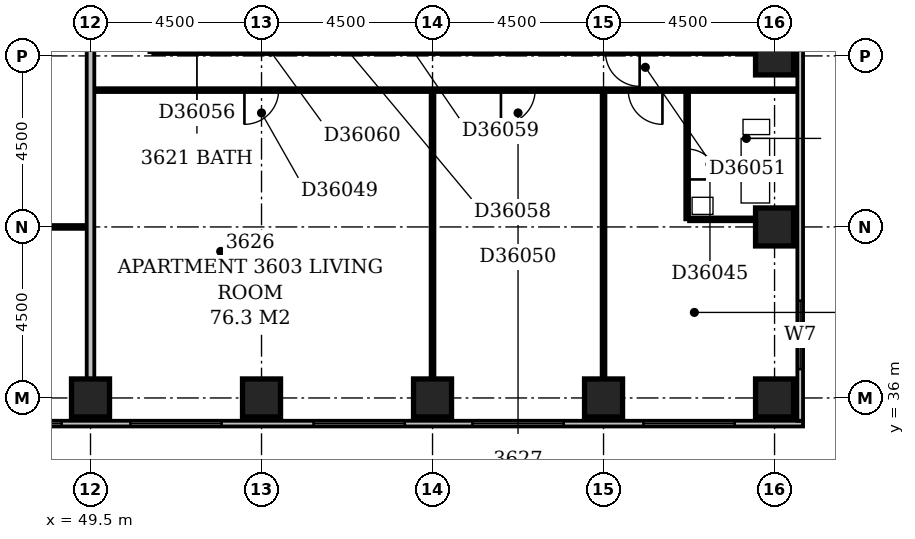
"""IFC4 building model, lengths in metres.
Left out: names, types, materials, properties, quantities, classifications, styles, units other than length and angle.
Written with IfcOpenShell. Run it as: python <this file> out.ifc"""

import sys

from ifc_helpers import new_model, si_unit, direction, frame, frame_2d, origin, origin_2d, place, context, subcontext, project, spatial, rectangle, extrude, element, fill, save


model = new_model("IFC4")
c1 = context("Model", 3, precision=1e-05, world=origin(), true_north=direction((0.0, 1.0)))
c2 = subcontext(c1, "Body", "Model", "MODEL_VIEW")
j1 = project(units=[si_unit("LENGTHUNIT", "METRE"), si_unit("PLANEANGLEUNIT", "RADIAN")], contexts=[c1])
p1 = place(None, origin())
s1 = spatial("IfcSite", under=j1, at=p1, CompositionType="ELEMENT")
p2 = place(p1, origin())
s2 = spatial("IfcBuilding", under=s1, at=p2, CompositionType="ELEMENT")
p3 = place(p2, frame((0.0, 0.0, 144.8)))
s3 = spatial("IfcBuildingStorey", under=s2, at=p3, CompositionType="ELEMENT", Elevation=144.8)
for number, where, z_axis, x_axis in (
    (1, (49.5, 36.0, -0.3), (0.0, 0.0, 1.0), (1.0, 0.0, 0.0)),
    (2, (54.0, 36.0, -0.3), (0.0, 0.0, 1.0), (1.0, 0.0, 0.0)),
    (3, (58.5, 36.0, -0.3), (0.0, 0.0, 1.0), (1.0, 0.0, 0.0)),
    (4, (63.0, 36.0, -0.3), (0.0, 0.0, 1.0), (1.0, 0.0, 0.0)),
    (5, (67.5, 36.0, -0.3), (0.0, 0.0, 1.0), (1.0, 0.0, 0.0)),
    (6, (67.5, 40.5, -0.3), (0.0, 0.0, 1.0), (1.0, 0.0, 0.0)),
    (7, (67.5, 45.0, -0.3), (0.0, 0.0, 1.0), (1.0, 0.0, 0.0)),
):
    element("IfcColumn", number, at=place(p3, frame(where, z_axis=z_axis, x_axis=x_axis)), inside=s3, PredefinedType="COLUMN", context=c2, shape_type="SweptSolid", body=[
        extrude(rectangle(XDim=1.0, YDim=1.0, at=origin_2d()), origin(), (0.0, 0.0, 1.0), 3.6),
    ])
p4 = place(p3, frame((23.1, 35.325, 0.0), z_axis=(0.0, 0.0, 1.0), x_axis=(1.0, 0.0, 0.0)))
e8 = element("IfcWall", 8, at=p4, inside=s3, PredefinedType="STANDARD", context=c2, shape_type="SweptSolid", body=[
    extrude(rectangle(XDim=45.15, YDim=0.15, at=frame_2d((22.575, 0.0))), origin(), (0.0, 0.0, 1.0), 2.7),
])
p5 = place(p4, frame((0.306, 0.0, 0.6)))
e9 = element("IfcOpeningElement", 9, at=p5, cuts=e8, PredefinedType="OPENING", context=c2, shape_type="SweptSolid", body=[
    extrude(rectangle(XDim=2.4, YDim=1.8, at=frame_2d((1.2, 0.9))), frame((0.0, 0.087, 0.0), z_axis=(0.0, -1.0, 0.0), x_axis=(1.0, 0.0, 0.0)), (0.0, 0.0, 1.0), 0.174),
])
p6 = place(p4, frame((4.95, 0.0, 0.6)))
e10 = element("IfcOpeningElement", 10, at=p6, cuts=e8, PredefinedType="OPENING", context=c2, shape_type="SweptSolid", body=[
    extrude(rectangle(XDim=2.4, YDim=1.8, at=frame_2d((1.2, 0.9))), frame((0.0, 0.087, 0.0), z_axis=(0.0, -1.0, 0.0), x_axis=(1.0, 0.0, 0.0)), (0.0, 0.0, 1.0), 0.174),
])
p7 = place(p4, frame((9.45, 0.0, 0.6)))
e11 = element("IfcOpeningElement", 11, at=p7, cuts=e8, PredefinedType="OPENING", context=c2, shape_type="SweptSolid", body=[
    extrude(rectangle(XDim=2.4, YDim=1.8, at=frame_2d((1.2, 0.9))), frame((0.0, 0.087, 0.0), z_axis=(0.0, -1.0, 0.0), x_axis=(1.0, 0.0, 0.0)), (0.0, 0.0, 1.0), 0.174),
])
p8 = place(p4, frame((13.95, 0.0, 0.6)))
e12 = element("IfcOpeningElement", 12, at=p8, cuts=e8, PredefinedType="OPENING", context=c2, shape_type="SweptSolid", body=[
    extrude(rectangle(XDim=2.4, YDim=1.8, at=frame_2d((1.2, 0.9))), frame((0.0, 0.087, 0.0), z_axis=(0.0, -1.0, 0.0), x_axis=(1.0, 0.0, 0.0)), (0.0, 0.0, 1.0), 0.174),
])
p9 = place(p4, frame((18.45, 0.0, 0.6)))
e13 = element("IfcOpeningElement", 13, at=p9, cuts=e8, PredefinedType="OPENING", context=c2, shape_type="SweptSolid", body=[
    extrude(rectangle(XDim=2.4, YDim=1.8, at=frame_2d((1.2, 0.9))), frame((0.0, 0.087, 0.0), z_axis=(0.0, -1.0, 0.0), x_axis=(1.0, 0.0, 0.0)), (0.0, 0.0, 1.0), 0.174),
])
p10 = place(p4, frame((23.84, 0.0, 0.6)))
e14 = element("IfcOpeningElement", 14, at=p10, cuts=e8, PredefinedType="OPENING", context=c2, shape_type="SweptSolid", body=[
    extrude(rectangle(XDim=1.8, YDim=1.8, at=frame_2d((0.9, 0.9))), frame((0.0, 0.087, 0.0), z_axis=(0.0, -1.0, 0.0), x_axis=(1.0, 0.0, 0.0)), (0.0, 0.0, 1.0), 0.174),
])
p11 = place(p4, frame((27.45, 0.0, 0.6)))
e15 = element("IfcOpeningElement", 15, at=p11, cuts=e8, PredefinedType="OPENING", context=c2, shape_type="SweptSolid", body=[
    extrude(rectangle(XDim=2.4, YDim=1.8, at=frame_2d((1.2, 0.9))), frame((0.0, 0.087, 0.0), z_axis=(0.0, -1.0, 0.0), x_axis=(1.0, 0.0, 0.0)), (0.0, 0.0, 1.0), 0.174),
])
p12 = place(p4, frame((32.27, 0.0, 0.6)))
e16 = element("IfcOpeningElement", 16, at=p12, cuts=e8, PredefinedType="OPENING", context=c2, shape_type="SweptSolid", body=[
    extrude(rectangle(XDim=2.4, YDim=1.8, at=frame_2d((1.2, 0.9))), frame((0.0, 0.087, 0.0), z_axis=(0.0, -1.0, 0.0), x_axis=(1.0, 0.0, 0.0)), (0.0, 0.0, 1.0), 0.174),
])
p13 = place(p4, frame((36.45, 0.0, 0.6)))
e17 = element("IfcOpeningElement", 17, at=p13, cuts=e8, PredefinedType="OPENING", context=c2, shape_type="SweptSolid", body=[
    extrude(rectangle(XDim=2.4, YDim=1.8, at=frame_2d((1.2, 0.9))), frame((0.0, 0.087, 0.0), z_axis=(0.0, -1.0, 0.0), x_axis=(1.0, 0.0, 0.0)), (0.0, 0.0, 1.0), 0.174),
])
p14 = place(p4, frame((40.95, 0.0, 0.6)))
e18 = element("IfcOpeningElement", 18, at=p14, cuts=e8, PredefinedType="OPENING", context=c2, shape_type="SweptSolid", body=[
    extrude(rectangle(XDim=2.4, YDim=1.8, at=frame_2d((1.2, 0.9))), frame((0.0, 0.087, 0.0), z_axis=(0.0, -1.0, 0.0), x_axis=(1.0, 0.0, 0.0)), (0.0, 0.0, 1.0), 0.174),
])
p15 = place(p3, frame((68.175, 35.4, 0.0), z_axis=(0.0, 0.0, 1.0), x_axis=(0.0, 1.0, 0.0)))
e19 = element("IfcWall", 19, at=p15, inside=s3, PredefinedType="STANDARD", context=c2, shape_type="SweptSolid", body=[
    extrude(rectangle(XDim=23.85, YDim=0.15, at=frame_2d((11.925, 0.0))), origin(), (0.0, 0.0, 1.0), 2.7),
])
p16 = place(p15, frame((1.36, 0.0, 0.6)))
e20 = element("IfcOpeningElement", 20, at=p16, cuts=e19, PredefinedType="OPENING", context=c2, shape_type="SweptSolid", body=[
    extrude(rectangle(XDim=1.8, YDim=1.8, at=frame_2d((0.9, 0.9))), frame((0.0, 0.087, 0.0), z_axis=(0.0, -1.0, 0.0), x_axis=(1.0, 0.0, 0.0)), (0.0, 0.0, 1.0), 0.174),
])
p17 = place(p15, frame((10.65, 0.0, 0.6)))
e21 = element("IfcOpeningElement", 21, at=p17, cuts=e19, PredefinedType="OPENING", context=c2, shape_type="SweptSolid", body=[
    extrude(rectangle(XDim=2.4, YDim=1.8, at=frame_2d((1.2, 0.9))), frame((0.0, 0.087, 0.0), z_axis=(0.0, -1.0, 0.0), x_axis=(1.0, 0.0, 0.0)), (0.0, 0.0, 1.0), 0.174),
])
p18 = place(p3, frame((49.5, 36.5, 0.0), z_axis=(0.0, 0.0, 1.0), x_axis=(0.0, 1.0, 0.0)))
e22 = element("IfcWall", 22, at=p18, inside=s3, PredefinedType="PARTITIONING", context=c2, shape_type="SweptSolid", body=[
    extrude(rectangle(XDim=12.9, YDim=0.2, at=frame_2d((6.45, 0.0))), origin(), (0.0, 0.0, 1.0), 3.3),
])
p19 = place(p3, frame((58.5, 36.5, 0.0), z_axis=(0.0, 0.0, 1.0), x_axis=(0.0, 1.0, 0.0)))
e23 = element("IfcWall", 23, at=p19, inside=s3, PredefinedType="PARTITIONING", context=c2, shape_type="SweptSolid", body=[
    extrude(rectangle(XDim=7.55, YDim=0.1, at=frame_2d((3.775, 0.0))), origin(), (0.0, 0.0, 1.0), 3.3),
])
p20 = place(p3, frame((63.0, 36.5, 0.0), z_axis=(0.0, 0.0, 1.0), x_axis=(0.0, 1.0, 0.0)))
e24 = element("IfcWall", 24, at=p20, inside=s3, PredefinedType="PARTITIONING", context=c2, shape_type="SweptSolid", body=[
    extrude(rectangle(XDim=7.55, YDim=0.1, at=frame_2d((3.775, 0.0))), origin(), (0.0, 0.0, 1.0), 2.4),
])
p21 = place(p3, frame((45.1, 40.5, 0.0), z_axis=(0.0, 0.0, 1.0), x_axis=(1.0, 0.0, 0.0)))
e25 = element("IfcWall", 25, at=p21, inside=s3, PredefinedType="PARTITIONING", context=c2, shape_type="SweptSolid", body=[
    extrude(rectangle(XDim=4.3, YDim=0.1, at=frame_2d((2.15, 0.0))), origin(), (0.0, 0.0, 1.0), 3.3),
])
p22 = place(p21, frame((1.7, 0.0, 0.0)))
e26 = element("IfcOpeningElement", 26, at=p22, cuts=e25, PredefinedType="OPENING", context=c2, shape_type="SweptSolid", body=[
    extrude(rectangle(XDim=0.9, YDim=2.1, at=frame_2d((0.45, 1.05))), frame((0.0, 0.062, 0.0), z_axis=(0.0, -1.0, 0.0), x_axis=(1.0, 0.0, 0.0)), (0.0, 0.0, 1.0), 0.124),
])
p23 = place(p3, frame((65.2, 40.7, 0.0), z_axis=(0.0, 0.0, 1.0), x_axis=(0.0, 1.0, 0.0)))
e27 = element("IfcWall", 27, at=p23, inside=s3, PredefinedType="PLUMBINGWALL", context=c2, shape_type="SweptSolid", body=[
    extrude(rectangle(XDim=3.35, YDim=0.1, at=frame_2d((1.675, 0.0))), origin(), (0.0, 0.0, 1.0), 3.3),
])
p24 = place(p23, frame((1.05, 0.0, 0.0)))
e28 = element("IfcOpeningElement", 28, at=p24, cuts=e27, PredefinedType="OPENING", context=c2, shape_type="SweptSolid", body=[
    extrude(rectangle(XDim=0.8, YDim=2.1, at=frame_2d((0.4, 1.05))), frame((0.0, 0.062, 0.0), z_axis=(0.0, -1.0, 0.0), x_axis=(1.0, 0.0, 0.0)), (0.0, 0.0, 1.0), 0.124),
])
p25 = place(p3, frame((65.25, 40.7, 0.0), z_axis=(0.0, 0.0, 1.0), x_axis=(1.0, 0.0, 0.0)))
e29 = element("IfcWall", 29, at=p25, inside=s3, PredefinedType="PLUMBINGWALL", context=c2, shape_type="SweptSolid", body=[
    extrude(rectangle(XDim=1.75, YDim=0.1, at=frame_2d((0.875, 0.0))), origin(), (0.0, 0.0, 1.0), 3.3),
])
p26 = place(p3, frame((49.6, 44.1, 0.0), z_axis=(0.0, 0.0, 1.0), x_axis=(1.0, 0.0, 0.0)))
e30 = element("IfcWall", 30, at=p26, inside=s3, PredefinedType="PARTITIONING", context=c2, shape_type="SweptSolid", body=[
    extrude(rectangle(XDim=18.5, YDim=0.1, at=frame_2d((9.25, 0.0))), origin(), (0.0, 0.0, 1.0), 3.3),
])
p27 = place(p26, frame((3.95, 0.0, 0.0)))
e31 = element("IfcOpeningElement", 31, at=p27, cuts=e30, PredefinedType="OPENING", context=c2, shape_type="SweptSolid", body=[
    extrude(rectangle(XDim=0.9, YDim=2.1, at=frame_2d((0.45, 1.05))), frame((0.0, 0.062, 0.0), z_axis=(0.0, -1.0, 0.0), x_axis=(1.0, 0.0, 0.0)), (0.0, 0.0, 1.0), 0.124),
])
p28 = place(p26, frame((10.7, 0.0, 0.0)))
e32 = element("IfcOpeningElement", 32, at=p28, cuts=e30, PredefinedType="OPENING", context=c2, shape_type="SweptSolid", body=[
    extrude(rectangle(XDim=0.9, YDim=2.1, at=frame_2d((0.45, 1.05))), frame((0.0, 0.062, 0.0), z_axis=(0.0, -1.0, 0.0), x_axis=(1.0, 0.0, 0.0)), (0.0, 0.0, 1.0), 0.124),
])
p29 = place(p26, frame((14.05, 0.0, 0.0)))
e33 = element("IfcOpeningElement", 33, at=p29, cuts=e30, PredefinedType="OPENING", context=c2, shape_type="SweptSolid", body=[
    extrude(rectangle(XDim=0.9, YDim=2.1, at=frame_2d((0.45, 1.05))), frame((0.0, 0.062, 0.0), z_axis=(0.0, -1.0, 0.0), x_axis=(1.0, 0.0, 0.0)), (0.0, 0.0, 1.0), 0.124),
])
p30 = place(p3, frame((51.15, 45.1, 0.0), z_axis=(0.0, 0.0, 1.0), x_axis=(1.0, 0.0, 0.0)))
e34 = element("IfcWall", 34, at=p30, inside=s3, PredefinedType="PARTITIONING", context=c2, shape_type="SweptSolid", body=[
    extrude(rectangle(XDim=15.85, YDim=0.1, at=frame_2d((7.925, 0.0))), origin(), (0.0, 0.0, 1.0), 3.3),
])
p31 = place(p30, frame((0.75, 0.0, 0.0)))
e35 = element("IfcOpeningElement", 35, at=p31, cuts=e34, PredefinedType="OPENING", context=c2, shape_type="SweptSolid", body=[
    extrude(rectangle(XDim=0.8, YDim=2.1, at=frame_2d((0.4, 1.05))), frame((0.0, 0.062, 0.0), z_axis=(0.0, -1.0, 0.0), x_axis=(1.0, 0.0, 0.0)), (0.0, 0.0, 1.0), 0.124),
])
p32 = place(p30, frame((11.9, 0.0, 0.0)))
e36 = element("IfcOpeningElement", 36, at=p32, cuts=e34, PredefinedType="OPENING", context=c2, shape_type="SweptSolid", body=[
    extrude(rectangle(XDim=0.9, YDim=2.1, at=frame_2d((0.45, 1.05))), frame((0.0, 0.062, 0.0), z_axis=(0.0, -1.0, 0.0), x_axis=(1.0, 0.0, 0.0)), (0.0, 0.0, 1.0), 0.124),
])
p33 = place(p30, frame((4.25, 0.0, 0.0)))
e37 = element("IfcOpeningElement", 37, at=p33, cuts=e34, PredefinedType="OPENING", context=c2, shape_type="SweptSolid", body=[
    extrude(rectangle(XDim=0.8, YDim=2.1, at=frame_2d((0.4, 1.05))), frame((0.0, 0.062, 0.0), z_axis=(0.0, -1.0, 0.0), x_axis=(1.0, 0.0, 0.0)), (0.0, 0.0, 1.0), 0.124),
])
p34 = place(p30, frame((6.05, 0.0, 0.0)))
e38 = element("IfcOpeningElement", 38, at=p34, cuts=e34, PredefinedType="OPENING", context=c2, shape_type="SweptSolid", body=[
    extrude(rectangle(XDim=0.8, YDim=2.1, at=frame_2d((0.4, 1.05))), frame((0.0, 0.062, 0.0), z_axis=(0.0, -1.0, 0.0), x_axis=(1.0, 0.0, 0.0)), (0.0, 0.0, 1.0), 0.124),
])
p35 = place(p30, frame((2.7, 0.0, 0.0)))
e39 = element("IfcOpeningElement", 39, at=p35, cuts=e34, PredefinedType="OPENING", context=c2, shape_type="SweptSolid", body=[
    extrude(rectangle(XDim=0.8, YDim=2.1, at=frame_2d((0.4, 1.05))), frame((0.0, 0.062, 0.0), z_axis=(0.0, -1.0, 0.0), x_axis=(1.0, 0.0, 0.0)), (0.0, 0.0, 1.0), 0.124),
])
p36 = place(p10, origin())
e40 = element("IfcWindow", 40, at=p36, inside=s3, PartitioningType="SINGLE_PANEL", PredefinedType="WINDOW", context=c2, shape_type="SweptSolid", body=[
    extrude(rectangle(XDim=1.8, YDim=1.8, at=frame_2d((0.9, 0.9))), frame((0.0, 0.03, 0.0), z_axis=(0.0, -1.0, 0.0), x_axis=(1.0, 0.0, 0.0)), (0.0, 0.0, 1.0), 0.06),
])
fill(e14, e40)
p37 = place(p11, origin())
e41 = element("IfcWindow", 41, at=p37, inside=s3, PartitioningType="SINGLE_PANEL", PredefinedType="WINDOW", context=c2, shape_type="SweptSolid", body=[
    extrude(rectangle(XDim=2.4, YDim=1.8, at=frame_2d((1.2, 0.9))), frame((0.0, 0.03, 0.0), z_axis=(0.0, -1.0, 0.0), x_axis=(1.0, 0.0, 0.0)), (0.0, 0.0, 1.0), 0.06),
])
fill(e15, e41)
p38 = place(p12, origin())
e42 = element("IfcWindow", 42, at=p38, inside=s3, PartitioningType="SINGLE_PANEL", PredefinedType="WINDOW", context=c2, shape_type="SweptSolid", body=[
    extrude(rectangle(XDim=2.4, YDim=1.8, at=frame_2d((1.2, 0.9))), frame((0.0, 0.03, 0.0), z_axis=(0.0, -1.0, 0.0), x_axis=(1.0, 0.0, 0.0)), (0.0, 0.0, 1.0), 0.06),
])
fill(e16, e42)
p39 = place(p13, origin())
e43 = element("IfcWindow", 43, at=p39, inside=s3, PartitioningType="SINGLE_PANEL", PredefinedType="WINDOW", context=c2, shape_type="SweptSolid", body=[
    extrude(rectangle(XDim=2.4, YDim=1.8, at=frame_2d((1.2, 0.9))), frame((0.0, 0.03, 0.0), z_axis=(0.0, -1.0, 0.0), x_axis=(1.0, 0.0, 0.0)), (0.0, 0.0, 1.0), 0.06),
])
fill(e17, e43)
p40 = place(p14, origin())
e44 = element("IfcWindow", 44, at=p40, inside=s3, PartitioningType="SINGLE_PANEL", PredefinedType="WINDOW", context=c2, shape_type="SweptSolid", body=[
    extrude(rectangle(XDim=2.4, YDim=1.8, at=frame_2d((1.2, 0.9))), frame((0.0, 0.03, 0.0), z_axis=(0.0, -1.0, 0.0), x_axis=(1.0, 0.0, 0.0)), (0.0, 0.0, 1.0), 0.06),
])
fill(e18, e44)
p41 = place(p16, origin())
e45 = element("IfcWindow", 45, at=p41, inside=s3, PartitioningType="SINGLE_PANEL", PredefinedType="WINDOW", context=c2, shape_type="SweptSolid", body=[
    extrude(rectangle(XDim=1.8, YDim=1.8, at=frame_2d((0.9, 0.9))), frame((0.0, 0.03, 0.0), z_axis=(0.0, -1.0, 0.0), x_axis=(1.0, 0.0, 0.0)), (0.0, 0.0, 1.0), 0.06),
])
fill(e20, e45)
p42 = place(p24, frame((0.8, 0.0, 0.0), z_axis=(0.0, 0.0, 1.0), x_axis=(-1.0, 0.0, 0.0)))
e46 = element("IfcDoor", 46, at=p42, inside=s3, OperationType="SINGLE_SWING_RIGHT", PredefinedType="DOOR", context=c2, shape_type="SweptSolid", body=[
    extrude(rectangle(XDim=0.8, YDim=2.1, at=frame_2d((0.4, 1.05))), frame((0.0, 0.025, 0.0), z_axis=(0.0, -1.0, 0.0), x_axis=(1.0, 0.0, 0.0)), (0.0, 0.0, 1.0), 0.05),
])
fill(e28, e46)
p43 = place(p27, frame((0.9, 0.0, 0.0), z_axis=(0.0, 0.0, 1.0), x_axis=(-1.0, 0.0, 0.0)))
e47 = element("IfcDoor", 47, at=p43, inside=s3, OperationType="SINGLE_SWING_RIGHT", PredefinedType="DOOR", context=c2, shape_type="SweptSolid", body=[
    extrude(rectangle(XDim=0.9, YDim=2.1, at=frame_2d((0.45, 1.05))), frame((0.0, 0.025, 0.0), z_axis=(0.0, -1.0, 0.0), x_axis=(1.0, 0.0, 0.0)), (0.0, 0.0, 1.0), 0.05),
])
fill(e31, e47)
p44 = place(p28, frame((0.9, 0.0, 0.0), z_axis=(0.0, 0.0, 1.0), x_axis=(-1.0, 0.0, 0.0)))
e48 = element("IfcDoor", 48, at=p44, inside=s3, OperationType="SINGLE_SWING_RIGHT", PredefinedType="DOOR", context=c2, shape_type="SweptSolid", body=[
    extrude(rectangle(XDim=0.9, YDim=2.1, at=frame_2d((0.45, 1.05))), frame((0.0, 0.025, 0.0), z_axis=(0.0, -1.0, 0.0), x_axis=(1.0, 0.0, 0.0)), (0.0, 0.0, 1.0), 0.05),
])
fill(e32, e48)
p45 = place(p29, origin())
e49 = element("IfcDoor", 49, at=p45, inside=s3, OperationType="SINGLE_SWING_RIGHT", PredefinedType="DOOR", context=c2, shape_type="SweptSolid", body=[
    extrude(rectangle(XDim=0.9, YDim=2.1, at=frame_2d((0.45, 1.05))), frame((0.0, 0.025, 0.0), z_axis=(0.0, -1.0, 0.0), x_axis=(1.0, 0.0, 0.0)), (0.0, 0.0, 1.0), 0.05),
])
fill(e33, e49)
p46 = place(p31, origin())
e50 = element("IfcDoor", 50, at=p46, inside=s3, OperationType="SINGLE_SWING_LEFT", PredefinedType="DOOR", context=c2, shape_type="SweptSolid", body=[
    extrude(rectangle(XDim=0.8, YDim=2.1, at=frame_2d((0.4, 1.05))), frame((0.0, 0.025, 0.0), z_axis=(0.0, -1.0, 0.0), x_axis=(1.0, 0.0, 0.0)), (0.0, 0.0, 1.0), 0.05),
])
fill(e35, e50)
p47 = place(p32, origin())
e51 = element("IfcDoor", 51, at=p47, inside=s3, OperationType="SINGLE_SWING_RIGHT", PredefinedType="DOOR", context=c2, shape_type="SweptSolid", body=[
    extrude(rectangle(XDim=0.9, YDim=2.1, at=frame_2d((0.45, 1.05))), frame((0.0, 0.025, 0.0), z_axis=(0.0, -1.0, 0.0), x_axis=(1.0, 0.0, 0.0)), (0.0, 0.0, 1.0), 0.05),
])
fill(e36, e51)
p48 = place(p33, origin())
e52 = element("IfcDoor", 52, at=p48, inside=s3, OperationType="SINGLE_SWING_LEFT", PredefinedType="DOOR", context=c2, shape_type="SweptSolid", body=[
    extrude(rectangle(XDim=0.8, YDim=2.1, at=frame_2d((0.4, 1.05))), frame((0.0, 0.025, 0.0), z_axis=(0.0, -1.0, 0.0), x_axis=(1.0, 0.0, 0.0)), (0.0, 0.0, 1.0), 0.05),
])
fill(e37, e52)
p49 = place(p34, origin())
e53 = element("IfcDoor", 53, at=p49, inside=s3, OperationType="SINGLE_SWING_LEFT", PredefinedType="DOOR", context=c2, shape_type="SweptSolid", body=[
    extrude(rectangle(XDim=0.8, YDim=2.1, at=frame_2d((0.4, 1.05))), frame((0.0, 0.025, 0.0), z_axis=(0.0, -1.0, 0.0), x_axis=(1.0, 0.0, 0.0)), (0.0, 0.0, 1.0), 0.05),
])
fill(e38, e53)
p50 = place(p35, origin())
e54 = element("IfcDoor", 54, at=p50, inside=s3, OperationType="SINGLE_SWING_LEFT", PredefinedType="DOOR", context=c2, shape_type="SweptSolid", body=[
    extrude(rectangle(XDim=0.8, YDim=2.1, at=frame_2d((0.4, 1.05))), frame((0.0, 0.025, 0.0), z_axis=(0.0, -1.0, 0.0), x_axis=(1.0, 0.0, 0.0)), (0.0, 0.0, 1.0), 0.05),
])
fill(e39, e54)
save(model, sys.argv[1])
